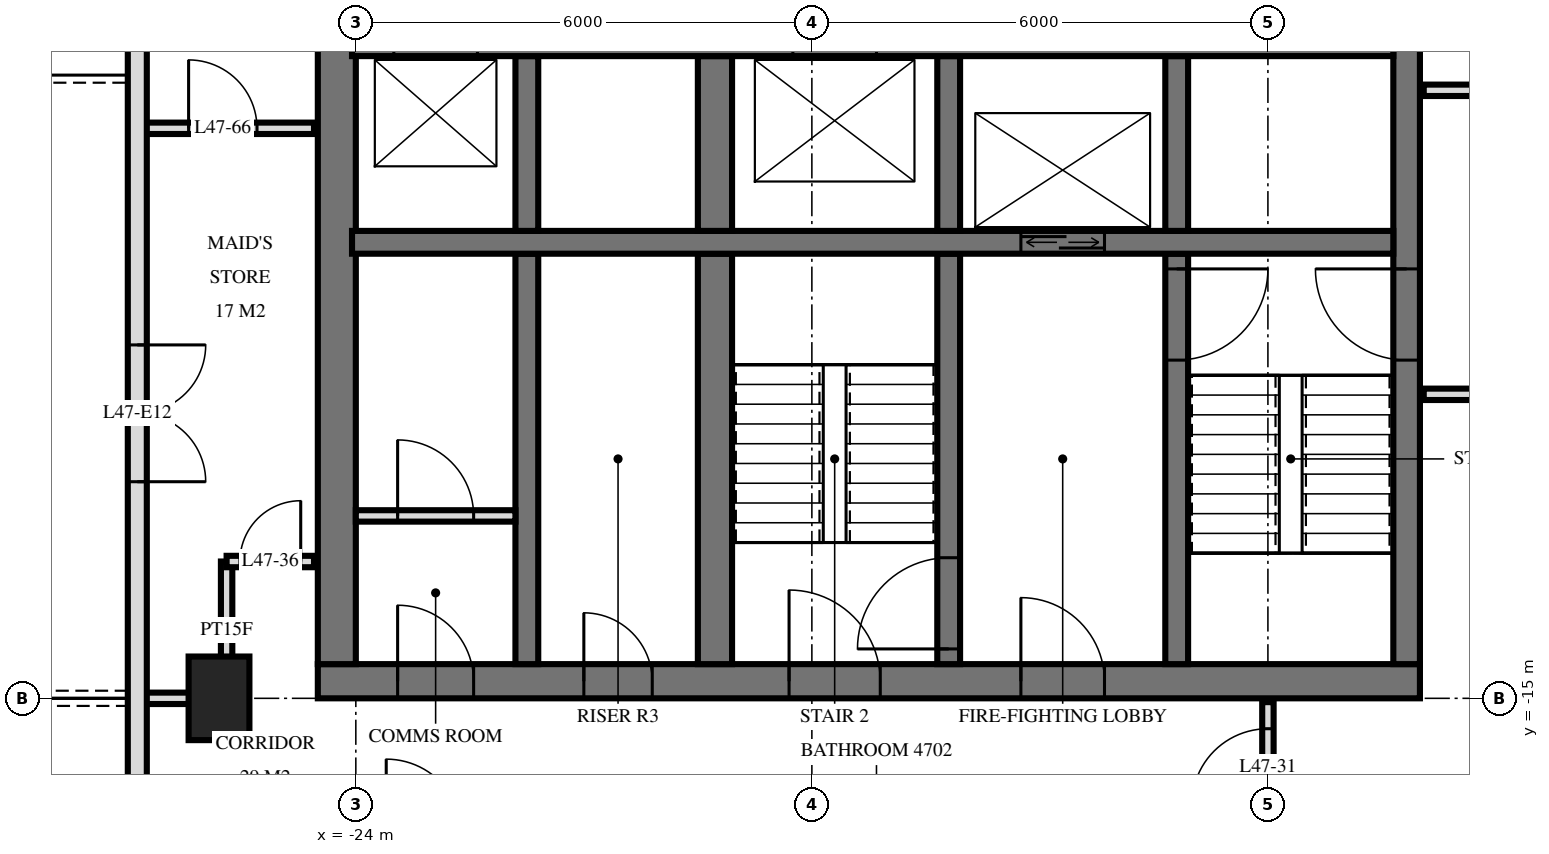
"""IFC4 building model, lengths in metres.
Left out: names, types, materials, properties, quantities, classifications, styles, units other than length and angle.
Written with IfcOpenShell. Run it as: python <this file> out.ifc"""

import sys

from ifc_helpers import new_model, si_unit, direction, frame, frame_2d, origin, origin_2d, place, context, subcontext, project, spatial, rectangle, extrude, element, fill, save


model = new_model("IFC4")
c1 = context("Model", 3, precision=1e-05, world=origin(), true_north=direction((0.0, 1.0)))
c2 = subcontext(c1, "Body", "Model", "MODEL_VIEW")
j1 = project(units=[si_unit("LENGTHUNIT", "METRE"), si_unit("PLANEANGLEUNIT", "RADIAN")], contexts=[c1])
p1 = place(None, origin())
s1 = spatial("IfcSite", under=j1, at=p1, CompositionType="ELEMENT")
p2 = place(p1, origin())
s2 = spatial("IfcBuilding", under=s1, at=p2, CompositionType="ELEMENT")
p3 = place(p2, frame((0.0, 0.0, 183.6)))
s3 = spatial("IfcBuildingStorey", under=s2, at=p3, CompositionType="ELEMENT", Elevation=183.6)
p4 = place(p3, frame((-25.8, -15.0, -0.28), z_axis=(0.0, 0.0, 1.0), x_axis=(0.0, 1.0, 0.0)))
e1 = element("IfcColumn", 1, at=p4, inside=s3, PredefinedType="COLUMN", context=c2, shape_type="SweptSolid", body=[
    extrude(rectangle(XDim=1.1, YDim=0.8, at=origin_2d()), origin(), (0.0, 0.0, 1.0), 3.78),
])
p5 = place(p3, frame((-24.5, -14.775, 0.0), z_axis=(0.0, 0.0, 1.0), x_axis=(1.0, 0.0, 0.0)))
e2 = element("IfcWall", 2, at=p5, inside=s3, PredefinedType="SHEAR", context=c2, shape_type="SweptSolid", body=[
    extrude(rectangle(XDim=14.5, YDim=0.45, at=frame_2d((7.25, 0.0))), origin(), (0.0, 0.0, 1.0), 3.5),
])
p6 = place(p5, frame((6.2, 0.0, 0.0)))
e3 = element("IfcOpeningElement", 3, at=p6, cuts=e2, PredefinedType="OPENING", context=c2, shape_type="SweptSolid", body=[
    extrude(rectangle(XDim=1.2, YDim=2.1, at=frame_2d((0.6, 1.05))), frame((0.0, 0.235, 0.0), z_axis=(0.0, -1.0, 0.0), x_axis=(1.0, 0.0, 0.0)), (0.0, 0.0, 1.0), 0.47),
])
p7 = place(p5, frame((9.25, 0.0, 0.0)))
e4 = element("IfcOpeningElement", 4, at=p7, cuts=e2, PredefinedType="OPENING", context=c2, shape_type="SweptSolid", body=[
    extrude(rectangle(XDim=1.1, YDim=2.1, at=frame_2d((0.55, 1.05))), frame((0.0, 0.235, 0.0), z_axis=(0.0, -1.0, 0.0), x_axis=(1.0, 0.0, 0.0)), (0.0, 0.0, 1.0), 0.47),
])
p8 = place(p5, frame((3.5, 0.0, 0.0)))
e5 = element("IfcOpeningElement", 5, at=p8, cuts=e2, PredefinedType="OPENING", context=c2, shape_type="SweptSolid", body=[
    extrude(rectangle(XDim=0.9, YDim=2.1, at=frame_2d((0.45, 1.05))), frame((0.0, 0.235, 0.0), z_axis=(0.0, -1.0, 0.0), x_axis=(1.0, 0.0, 0.0)), (0.0, 0.0, 1.0), 0.47),
])
p9 = place(p5, frame((1.05, 0.0, 0.0)))
e6 = element("IfcOpeningElement", 6, at=p9, cuts=e2, PredefinedType="OPENING", context=c2, shape_type="SweptSolid", body=[
    extrude(rectangle(XDim=1.0, YDim=2.1, at=frame_2d((0.5, 1.05))), frame((0.0, 0.235, 0.0), z_axis=(0.0, -1.0, 0.0), x_axis=(1.0, 0.0, 0.0)), (0.0, 0.0, 1.0), 0.47),
])
p10 = place(p3, frame((-10.175, -14.55, 0.0), z_axis=(0.0, 0.0, 1.0), x_axis=(0.0, 1.0, 0.0)))
e7 = element("IfcWall", 7, at=p10, inside=s3, PredefinedType="SHEAR", context=c2, shape_type="SweptSolid", body=[
    extrude(rectangle(XDim=14.1, YDim=0.35, at=frame_2d((7.05, 0.0))), origin(), (0.0, 0.0, 1.0), 3.5),
])
p11 = place(p10, frame((8.4, 0.0, 0.0)))
e8 = element("IfcOpeningElement", 8, at=p11, cuts=e7, PredefinedType="OPENING", context=c2, shape_type="SweptSolid", body=[
    extrude(rectangle(XDim=1.4, YDim=2.4, at=frame_2d((0.7, 1.2))), frame((0.0, 0.185, 0.0), z_axis=(0.0, -1.0, 0.0), x_axis=(1.0, 0.0, 0.0)), (0.0, 0.0, 1.0), 0.37),
])
p12 = place(p10, frame((10.0, 0.0, 0.0)))
e9 = element("IfcOpeningElement", 9, at=p12, cuts=e7, PredefinedType="OPENING", context=c2, shape_type="SweptSolid", body=[
    extrude(rectangle(XDim=1.4, YDim=2.4, at=frame_2d((0.7, 1.2))), frame((0.0, 0.185, 0.0), z_axis=(0.0, -1.0, 0.0), x_axis=(1.0, 0.0, 0.0)), (0.0, 0.0, 1.0), 0.37),
])
p13 = place(p10, frame((4.0, 0.0, 0.0)))
e10 = element("IfcOpeningElement", 10, at=p13, cuts=e7, PredefinedType="OPENING", context=c2, shape_type="SweptSolid", body=[
    extrude(rectangle(XDim=1.2, YDim=2.1, at=frame_2d((0.6, 1.05))), frame((0.0, 0.185, 0.0), z_axis=(0.0, -1.0, 0.0), x_axis=(1.0, 0.0, 0.0)), (0.0, 0.0, 1.0), 0.37),
])
p14 = place(p3, frame((-24.25, -14.55, 0.0), z_axis=(0.0, 0.0, 1.0), x_axis=(0.0, 1.0, 0.0)))
e11 = element("IfcWall", 11, at=p14, inside=s3, PredefinedType="SHEAR", context=c2, shape_type="SweptSolid", body=[
    extrude(rectangle(XDim=14.1, YDim=0.5, at=frame_2d((7.05, 0.0))), origin(), (0.0, 0.0, 1.0), 3.5),
])
p15 = place(p3, frame((-24.05, -6.4, 0.0), z_axis=(0.0, 0.0, 1.0), x_axis=(1.0, 0.0, 0.0)))
e12 = element("IfcWall", 12, at=p15, inside=s3, PredefinedType="SHEAR", context=c2, shape_type="SweptSolid", body=[
    extrude(rectangle(XDim=13.7, YDim=0.3, at=frame_2d((6.85, 0.0))), origin(), (0.0, 0.0, 1.0), 3.5),
])
p16 = place(p15, frame((0.55, 0.0, 0.0)))
e13 = element("IfcOpeningElement", 13, at=p16, cuts=e12, PredefinedType="OPENING", context=c2, shape_type="SweptSolid", body=[
    extrude(rectangle(XDim=1.1, YDim=2.1, at=frame_2d((0.55, 1.05))), frame((0.0, 0.16, 0.0), z_axis=(0.0, -1.0, 0.0), x_axis=(1.0, 0.0, 0.0)), (0.0, 0.0, 1.0), 0.32),
])
p17 = place(p15, frame((5.8, 0.0, 0.0)))
e14 = element("IfcOpeningElement", 14, at=p17, cuts=e12, PredefinedType="OPENING", context=c2, shape_type="SweptSolid", body=[
    extrude(rectangle(XDim=1.1, YDim=2.1, at=frame_2d((0.55, 1.05))), frame((0.0, 0.16, 0.0), z_axis=(0.0, -1.0, 0.0), x_axis=(1.0, 0.0, 0.0)), (0.0, 0.0, 1.0), 0.32),
])
p18 = place(p3, frame((-24.05, -9.0, 0.0), z_axis=(0.0, 0.0, 1.0), x_axis=(1.0, 0.0, 0.0)))
e15 = element("IfcWall", 15, at=p18, inside=s3, PredefinedType="SHEAR", context=c2, shape_type="SweptSolid", body=[
    extrude(rectangle(XDim=13.7, YDim=0.3, at=frame_2d((6.85, 0.0))), origin(), (0.0, 0.0, 1.0), 3.5),
])
p19 = place(p18, frame((8.8, 0.0, 0.0)))
e16 = element("IfcOpeningElement", 16, at=p19, cuts=e15, PredefinedType="OPENING", context=c2, shape_type="SweptSolid", body=[
    extrude(rectangle(XDim=1.1, YDim=2.1, at=frame_2d((0.55, 1.05))), frame((0.0, 0.16, 0.0), z_axis=(0.0, -1.0, 0.0), x_axis=(1.0, 0.0, 0.0)), (0.0, 0.0, 1.0), 0.32),
])
p20 = place(p3, frame((-13.2, -8.85, 0.0), z_axis=(0.0, 0.0, 1.0), x_axis=(0.0, 1.0, 0.0)))
e17 = element("IfcWall", 17, at=p20, inside=s3, PredefinedType="SHEAR", context=c2, shape_type="SweptSolid", body=[
    extrude(rectangle(XDim=2.3, YDim=0.3, at=frame_2d((1.15, 0.0))), origin(), (0.0, 0.0, 1.0), 3.5),
])
p21 = place(p3, frame((-13.2, -14.55, 0.0), z_axis=(0.0, 0.0, 1.0), x_axis=(0.0, 1.0, 0.0)))
e18 = element("IfcWall", 18, at=p21, inside=s3, PredefinedType="SHEAR", context=c2, shape_type="SweptSolid", body=[
    extrude(rectangle(XDim=5.4, YDim=0.3, at=frame_2d((2.7, 0.0))), origin(), (0.0, 0.0, 1.0), 3.5),
])
p22 = place(p21, frame((4.0, 0.0, 0.0)))
e19 = element("IfcOpeningElement", 19, at=p22, cuts=e18, PredefinedType="OPENING", context=c2, shape_type="SweptSolid", body=[
    extrude(rectangle(XDim=1.2, YDim=2.1, at=frame_2d((0.6, 1.05))), frame((0.0, 0.16, 0.0), z_axis=(0.0, -1.0, 0.0), x_axis=(1.0, 0.0, 0.0)), (0.0, 0.0, 1.0), 0.32),
])
p23 = place(p3, frame((-16.2, -8.85, 0.0), z_axis=(0.0, 0.0, 1.0), x_axis=(0.0, 1.0, 0.0)))
e20 = element("IfcWall", 20, at=p23, inside=s3, PredefinedType="SHEAR", context=c2, shape_type="SweptSolid", body=[
    extrude(rectangle(XDim=2.3, YDim=0.3, at=frame_2d((1.15, 0.0))), origin(), (0.0, 0.0, 1.0), 3.5),
])
p24 = place(p3, frame((-16.2, -14.55, 0.0), z_axis=(0.0, 0.0, 1.0), x_axis=(0.0, 1.0, 0.0)))
e21 = element("IfcWall", 21, at=p24, inside=s3, PredefinedType="SHEAR", context=c2, shape_type="SweptSolid", body=[
    extrude(rectangle(XDim=5.4, YDim=0.3, at=frame_2d((2.7, 0.0))), origin(), (0.0, 0.0, 1.0), 3.5),
])
p25 = place(p24, frame((0.2, 0.0, 0.0)))
e22 = element("IfcOpeningElement", 22, at=p25, cuts=e21, PredefinedType="OPENING", context=c2, shape_type="SweptSolid", body=[
    extrude(rectangle(XDim=1.2, YDim=2.1, at=frame_2d((0.6, 1.05))), frame((0.0, 0.16, 0.0), z_axis=(0.0, -1.0, 0.0), x_axis=(1.0, 0.0, 0.0)), (0.0, 0.0, 1.0), 0.32),
])
p26 = place(p3, frame((-19.275, -8.85, 0.0), z_axis=(0.0, 0.0, 1.0), x_axis=(0.0, 1.0, 0.0)))
e23 = element("IfcWall", 23, at=p26, inside=s3, PredefinedType="SHEAR", context=c2, shape_type="SweptSolid", body=[
    extrude(rectangle(XDim=2.3, YDim=0.45, at=frame_2d((1.15, 0.0))), origin(), (0.0, 0.0, 1.0), 3.5),
])
p27 = place(p3, frame((-19.275, -14.55, 0.0), z_axis=(0.0, 0.0, 1.0), x_axis=(0.0, 1.0, 0.0)))
e24 = element("IfcWall", 24, at=p27, inside=s3, PredefinedType="SHEAR", context=c2, shape_type="SweptSolid", body=[
    extrude(rectangle(XDim=5.4, YDim=0.45, at=frame_2d((2.7, 0.0))), origin(), (0.0, 0.0, 1.0), 3.5),
])
p28 = place(p3, frame((-21.75, -8.85, 0.0), z_axis=(0.0, 0.0, 1.0), x_axis=(0.0, 1.0, 0.0)))
e25 = element("IfcWall", 25, at=p28, inside=s3, PredefinedType="SHEAR", context=c2, shape_type="SweptSolid", body=[
    extrude(rectangle(XDim=2.3, YDim=0.3, at=frame_2d((1.15, 0.0))), origin(), (0.0, 0.0, 1.0), 3.5),
])
p29 = place(p3, frame((-21.75, -14.55, 0.0), z_axis=(0.0, 0.0, 1.0), x_axis=(0.0, 1.0, 0.0)))
e26 = element("IfcWall", 26, at=p29, inside=s3, PredefinedType="SHEAR", context=c2, shape_type="SweptSolid", body=[
    extrude(rectangle(XDim=5.4, YDim=0.3, at=frame_2d((2.7, 0.0))), origin(), (0.0, 0.0, 1.0), 3.5),
])
p30 = place(p3, frame((-26.875, -3.325, 0.0), z_axis=(0.0, 0.0, 1.0), x_axis=(0.0, -1.0, 0.0)))
e27 = element("IfcWall", 27, at=p30, inside=s3, PredefinedType="SOLIDWALL", context=c2, shape_type="SweptSolid", body=[
    extrude(rectangle(XDim=21.551, YDim=0.25, at=frame_2d((10.775, 0.0))), origin(), (0.0, 0.0, 1.0), 3.22),
])
p31 = place(p30, frame((7.025, 0.0, 0.0)))
e28 = element("IfcOpeningElement", 28, at=p31, cuts=e27, PredefinedType="OPENING", context=c2, shape_type="SweptSolid", body=[
    extrude(rectangle(XDim=1.8, YDim=2.4, at=frame_2d((0.9, 1.2))), frame((0.0, 0.135, 0.0), z_axis=(0.0, -1.0, 0.0), x_axis=(1.0, 0.0, 0.0)), (0.0, 0.0, 1.0), 0.27),
])
p32 = place(p30, frame((14.075, 0.0, 0.0)))
e29 = element("IfcOpeningElement", 29, at=p32, cuts=e27, PredefinedType="OPENING", context=c2, shape_type="SweptSolid", body=[
    extrude(rectangle(XDim=1.8, YDim=2.4, at=frame_2d((0.9, 1.2))), frame((0.0, 0.135, 0.0), z_axis=(0.0, -1.0, 0.0), x_axis=(1.0, 0.0, 0.0)), (0.0, 0.0, 1.0), 0.27),
])
p33 = place(p30, frame((18.875, 0.0, 0.0)))
e30 = element("IfcOpeningElement", 30, at=p33, cuts=e27, PredefinedType="OPENING", context=c2, shape_type="SweptSolid", body=[
    extrude(rectangle(XDim=1.8, YDim=2.4, at=frame_2d((0.9, 1.2))), frame((0.0, 0.135, 0.0), z_axis=(0.0, -1.0, 0.0), x_axis=(1.0, 0.0, 0.0)), (0.0, 0.0, 1.0), 0.27),
])
p34 = place(p3, frame((-24.0, -12.6, 0.0), z_axis=(0.0, 0.0, 1.0), x_axis=(1.0, 0.0, 0.0)))
e31 = element("IfcWall", 31, at=p34, inside=s3, PredefinedType="PARTITIONING", context=c2, shape_type="SweptSolid", body=[
    extrude(rectangle(XDim=2.1, YDim=0.15, at=frame_2d((1.05, 0.0))), origin(), (0.0, 0.0, 1.0), 3.2),
])
p35 = place(p34, frame((0.55, 0.0, 0.0)))
e32 = element("IfcOpeningElement", 32, at=p35, cuts=e31, PredefinedType="OPENING", context=c2, shape_type="SweptSolid", body=[
    extrude(rectangle(XDim=1.0, YDim=2.1, at=frame_2d((0.5, 1.05))), frame((0.0, 0.085, 0.0), z_axis=(0.0, -1.0, 0.0), x_axis=(1.0, 0.0, 0.0)), (0.0, 0.0, 1.0), 0.17),
])
p36 = place(p3, frame((-12.0, -16.8, 0.0), z_axis=(0.0, 0.0, 1.0), x_axis=(0.0, 1.0, 0.0)))
e33 = element("IfcWall", 33, at=p36, inside=s3, PredefinedType="PARTITIONING", context=c2, shape_type="SweptSolid", body=[
    extrude(rectangle(XDim=1.75, YDim=0.15, at=frame_2d((0.875, 0.0))), origin(), (0.0, 0.0, 1.0), 3.22),
])
p37 = place(p36, frame((0.4, 0.0, 0.0)))
e34 = element("IfcOpeningElement", 34, at=p37, cuts=e33, PredefinedType="OPENING", context=c2, shape_type="SweptSolid", body=[
    extrude(rectangle(XDim=1.0, YDim=2.1, at=frame_2d((0.5, 1.05))), frame((0.0, 0.085, 0.0), z_axis=(0.0, -1.0, 0.0), x_axis=(1.0, 0.0, 0.0)), (0.0, 0.0, 1.0), 0.17),
])
p38 = place(p3, frame((-25.7, -15.0, 0.0), z_axis=(0.0, 0.0, 1.0), x_axis=(0.0, 1.0, 0.0)))
e35 = element("IfcWall", 35, at=p38, inside=s3, PredefinedType="PARTITIONING", context=c2, shape_type="SweptSolid", body=[
    extrude(rectangle(XDim=1.8, YDim=0.15, at=frame_2d((0.9, 0.0))), origin(), (0.0, 0.0, 1.0), 3.22),
])
p39 = place(p3, frame((-26.82, -15.0, 0.0), z_axis=(0.0, 0.0, 1.0), x_axis=(1.0, 0.0, 0.0)))
e36 = element("IfcWall", 36, at=p39, inside=s3, PredefinedType="PARTITIONING", context=c2, shape_type="SweptSolid", body=[
    extrude(rectangle(XDim=1.12, YDim=0.15, at=frame_2d((0.56, 0.0))), origin(), (0.0, 0.0, 1.0), 3.22),
])
p40 = place(p3, frame((-25.7, -13.2, 0.0), z_axis=(0.0, 0.0, 1.0), x_axis=(1.0, 0.0, 0.0)))
e37 = element("IfcWall", 37, at=p40, inside=s3, PredefinedType="PARTITIONING", context=c2, shape_type="SweptSolid", body=[
    extrude(rectangle(XDim=1.15, YDim=0.15, at=frame_2d((0.575, 0.0))), origin(), (0.0, 0.0, 1.0), 3.22),
])
p41 = place(p40, frame((0.175, 0.0, 0.0)))
e38 = element("IfcOpeningElement", 38, at=p41, cuts=e37, PredefinedType="OPENING", context=c2, shape_type="SweptSolid", body=[
    extrude(rectangle(XDim=0.8, YDim=2.1, at=frame_2d((0.4, 1.05))), frame((0.0, 0.085, 0.0), z_axis=(0.0, -1.0, 0.0), x_axis=(1.0, 0.0, 0.0)), (0.0, 0.0, 1.0), 0.17),
])
p42 = place(p3, frame((-9.95, -11.0, 0.0), z_axis=(0.0, 0.0, 1.0), x_axis=(1.0, 0.0, 0.0)))
e39 = element("IfcWall", 39, at=p42, inside=s3, PredefinedType="PARTITIONING", context=c2, shape_type="SweptSolid", body=[
    extrude(rectangle(XDim=19.9, YDim=0.15, at=frame_2d((9.95, 0.0))), origin(), (0.0, 0.0, 1.0), 3.22),
])
p43 = place(p42, frame((9.45, 0.0, 0.0)))
e40 = element("IfcOpeningElement", 40, at=p43, cuts=e39, PredefinedType="OPENING", context=c2, shape_type="SweptSolid", body=[
    extrude(rectangle(XDim=1.0, YDim=2.1, at=frame_2d((0.5, 1.05))), frame((0.0, 0.085, 0.0), z_axis=(0.0, -1.0, 0.0), x_axis=(1.0, 0.0, 0.0)), (0.0, 0.0, 1.0), 0.17),
])
p44 = place(p42, frame((15.45, 0.0, 0.0)))
e41 = element("IfcOpeningElement", 41, at=p44, cuts=e39, PredefinedType="OPENING", context=c2, shape_type="SweptSolid", body=[
    extrude(rectangle(XDim=1.0, YDim=2.1, at=frame_2d((0.5, 1.05))), frame((0.0, 0.085, 0.0), z_axis=(0.0, -1.0, 0.0), x_axis=(1.0, 0.0, 0.0)), (0.0, 0.0, 1.0), 0.17),
])
p45 = place(p3, frame((-26.82, -7.5, 0.0), z_axis=(0.0, 0.0, 1.0), x_axis=(1.0, 0.0, 0.0)))
e42 = element("IfcWall", 42, at=p45, inside=s3, PredefinedType="PARTITIONING", context=c2, shape_type="SweptSolid", body=[
    extrude(rectangle(XDim=2.27, YDim=0.15, at=frame_2d((1.135, 0.0))), origin(), (0.0, 0.0, 1.0), 3.22),
])
p46 = place(p45, frame((0.62, 0.0, 0.0)))
e43 = element("IfcOpeningElement", 43, at=p46, cuts=e42, PredefinedType="OPENING", context=c2, shape_type="SweptSolid", body=[
    extrude(rectangle(XDim=0.9, YDim=2.1, at=frame_2d((0.45, 1.05))), frame((0.0, 0.085, 0.0), z_axis=(0.0, -1.0, 0.0), x_axis=(1.0, 0.0, 0.0)), (0.0, 0.0, 1.0), 0.17),
])
p47 = place(p3, frame((-9.95, -7.0, 0.0), z_axis=(0.0, 0.0, 1.0), x_axis=(1.0, 0.0, 0.0)))
e44 = element("IfcWall", 44, at=p47, inside=s3, PredefinedType="PARTITIONING", context=c2, shape_type="SweptSolid", body=[
    extrude(rectangle(XDim=19.9, YDim=0.15, at=frame_2d((9.95, 0.0))), origin(), (0.0, 0.0, 1.0), 3.22),
])
p48 = place(p47, frame((9.45, 0.0, 0.0)))
e45 = element("IfcOpeningElement", 45, at=p48, cuts=e44, PredefinedType="OPENING", context=c2, shape_type="SweptSolid", body=[
    extrude(rectangle(XDim=1.0, YDim=2.1, at=frame_2d((0.5, 1.05))), frame((0.0, 0.085, 0.0), z_axis=(0.0, -1.0, 0.0), x_axis=(1.0, 0.0, 0.0)), (0.0, 0.0, 1.0), 0.17),
])
p49 = place(p47, frame((3.45, 0.0, 0.0)))
e46 = element("IfcOpeningElement", 46, at=p49, cuts=e44, PredefinedType="OPENING", context=c2, shape_type="SweptSolid", body=[
    extrude(rectangle(XDim=1.0, YDim=2.1, at=frame_2d((0.5, 1.05))), frame((0.0, 0.085, 0.0), z_axis=(0.0, -1.0, 0.0), x_axis=(1.0, 0.0, 0.0)), (0.0, 0.0, 1.0), 0.17),
])
p50 = place(p31, origin())
e47 = element("IfcDoor", 47, at=p50, inside=s3, OperationType="DOUBLE_DOOR_SINGLE_SWING", PredefinedType="DOOR", context=c2, shape_type="SweptSolid", body=[
    extrude(rectangle(XDim=1.8, YDim=2.4, at=frame_2d((0.9, 1.2))), frame((0.0, 0.025, 0.0), z_axis=(0.0, -1.0, 0.0), x_axis=(1.0, 0.0, 0.0)), (0.0, 0.0, 1.0), 0.05),
])
fill(e28, e47)
p51 = place(p19, origin())
e48 = element("IfcDoor", 48, at=p51, inside=s3, OperationType="DOUBLE_DOOR_SLIDING", PredefinedType="USERDEFINED", context=c2, shape_type="SweptSolid", body=[
    extrude(rectangle(XDim=1.1, YDim=2.1, at=frame_2d((0.55, 1.05))), frame((0.0, 0.025, 0.0), z_axis=(0.0, -1.0, 0.0), x_axis=(1.0, 0.0, 0.0)), (0.0, 0.0, 1.0), 0.05),
])
fill(e16, e48)
p52 = place(p13, origin())
e49 = element("IfcDoor", 49, at=p52, inside=s3, OperationType="SINGLE_SWING_LEFT", PredefinedType="DOOR", context=c2, shape_type="SweptSolid", body=[
    extrude(rectangle(XDim=1.2, YDim=2.1, at=frame_2d((0.6, 1.05))), frame((0.0, 0.025, 0.0), z_axis=(0.0, -1.0, 0.0), x_axis=(1.0, 0.0, 0.0)), (0.0, 0.0, 1.0), 0.05),
])
fill(e10, e49)
p53 = place(p6, origin())
e50 = element("IfcDoor", 50, at=p53, inside=s3, OperationType="SINGLE_SWING_RIGHT", PredefinedType="DOOR", context=c2, shape_type="SweptSolid", body=[
    extrude(rectangle(XDim=1.2, YDim=2.1, at=frame_2d((0.6, 1.05))), frame((0.0, 0.025, 0.0), z_axis=(0.0, -1.0, 0.0), x_axis=(1.0, 0.0, 0.0)), (0.0, 0.0, 1.0), 0.05),
])
fill(e3, e50)
p54 = place(p7, origin())
e51 = element("IfcDoor", 51, at=p54, inside=s3, OperationType="SINGLE_SWING_RIGHT", PredefinedType="DOOR", context=c2, shape_type="SweptSolid", body=[
    extrude(rectangle(XDim=1.1, YDim=2.1, at=frame_2d((0.55, 1.05))), frame((0.0, 0.025, 0.0), z_axis=(0.0, -1.0, 0.0), x_axis=(1.0, 0.0, 0.0)), (0.0, 0.0, 1.0), 0.05),
])
fill(e4, e51)
p55 = place(p8, origin())
e52 = element("IfcDoor", 52, at=p55, inside=s3, OperationType="SINGLE_SWING_RIGHT", PredefinedType="DOOR", context=c2, shape_type="SweptSolid", body=[
    extrude(rectangle(XDim=0.9, YDim=2.1, at=frame_2d((0.45, 1.05))), frame((0.0, 0.025, 0.0), z_axis=(0.0, -1.0, 0.0), x_axis=(1.0, 0.0, 0.0)), (0.0, 0.0, 1.0), 0.05),
])
fill(e5, e52)
p56 = place(p9, origin())
e53 = element("IfcDoor", 53, at=p56, inside=s3, OperationType="SINGLE_SWING_RIGHT", PredefinedType="DOOR", context=c2, shape_type="SweptSolid", body=[
    extrude(rectangle(XDim=1.0, YDim=2.1, at=frame_2d((0.5, 1.05))), frame((0.0, 0.025, 0.0), z_axis=(0.0, -1.0, 0.0), x_axis=(1.0, 0.0, 0.0)), (0.0, 0.0, 1.0), 0.05),
])
fill(e6, e53)
p57 = place(p22, frame((0.6, 0.0, 0.0), z_axis=(0.0, 0.0, 1.0), x_axis=(-1.0, 0.0, 0.0)))
e54 = element("IfcDoor", 54, at=p57, inside=s3, OperationType="SINGLE_SWING_RIGHT", PredefinedType="DOOR", context=c2, shape_type="SweptSolid", body=[
    extrude(rectangle(XDim=1.2, YDim=2.1, at=frame_2d((0.0, 1.05))), frame((0.0, -0.025, 0.0), z_axis=(0.0, 1.0, 0.0), x_axis=(-1.0, 0.0, 0.0)), (0.0, 0.0, 1.0), 0.05),
])
fill(e19, e54)
p58 = place(p25, origin())
e55 = element("IfcDoor", 55, at=p58, inside=s3, OperationType="SINGLE_SWING_RIGHT", PredefinedType="DOOR", context=c2, shape_type="SweptSolid", body=[
    extrude(rectangle(XDim=1.2, YDim=2.1, at=frame_2d((0.6, 1.05))), frame((0.0, 0.025, 0.0), z_axis=(0.0, -1.0, 0.0), x_axis=(1.0, 0.0, 0.0)), (0.0, 0.0, 1.0), 0.05),
])
fill(e22, e55)
p59 = place(p35, origin())
e56 = element("IfcDoor", 56, at=p59, inside=s3, OperationType="SINGLE_SWING_RIGHT", PredefinedType="DOOR", context=c2, shape_type="SweptSolid", body=[
    extrude(rectangle(XDim=1.0, YDim=2.1, at=frame_2d((0.5, 1.05))), frame((0.0, 0.025, 0.0), z_axis=(0.0, -1.0, 0.0), x_axis=(1.0, 0.0, 0.0)), (0.0, 0.0, 1.0), 0.05),
])
fill(e32, e56)
p60 = place(p37, origin())
e57 = element("IfcDoor", 57, at=p60, inside=s3, OperationType="SINGLE_SWING_RIGHT", PredefinedType="DOOR", context=c2, shape_type="SweptSolid", body=[
    extrude(rectangle(XDim=1.0, YDim=2.1, at=frame_2d((0.5, 1.05))), frame((0.0, 0.025, 0.0), z_axis=(0.0, -1.0, 0.0), x_axis=(1.0, 0.0, 0.0)), (0.0, 0.0, 1.0), 0.05),
])
fill(e34, e57)
p61 = place(p41, origin())
e58 = element("IfcDoor", 58, at=p61, inside=s3, OperationType="SINGLE_SWING_LEFT", PredefinedType="DOOR", context=c2, shape_type="SweptSolid", body=[
    extrude(rectangle(XDim=0.8, YDim=2.1, at=frame_2d((0.4, 1.05))), frame((0.0, 0.025, 0.0), z_axis=(0.0, -1.0, 0.0), x_axis=(1.0, 0.0, 0.0)), (0.0, 0.0, 1.0), 0.05),
])
fill(e38, e58)
p62 = place(p46, origin())
e59 = element("IfcDoor", 59, at=p62, inside=s3, OperationType="SINGLE_SWING_RIGHT", PredefinedType="DOOR", context=c2, shape_type="SweptSolid", body=[
    extrude(rectangle(XDim=0.9, YDim=2.1, at=frame_2d((0.45, 1.05))), frame((0.0, 0.025, 0.0), z_axis=(0.0, -1.0, 0.0), x_axis=(1.0, 0.0, 0.0)), (0.0, 0.0, 1.0), 0.05),
])
fill(e43, e59)
save(model, sys.argv[1])
